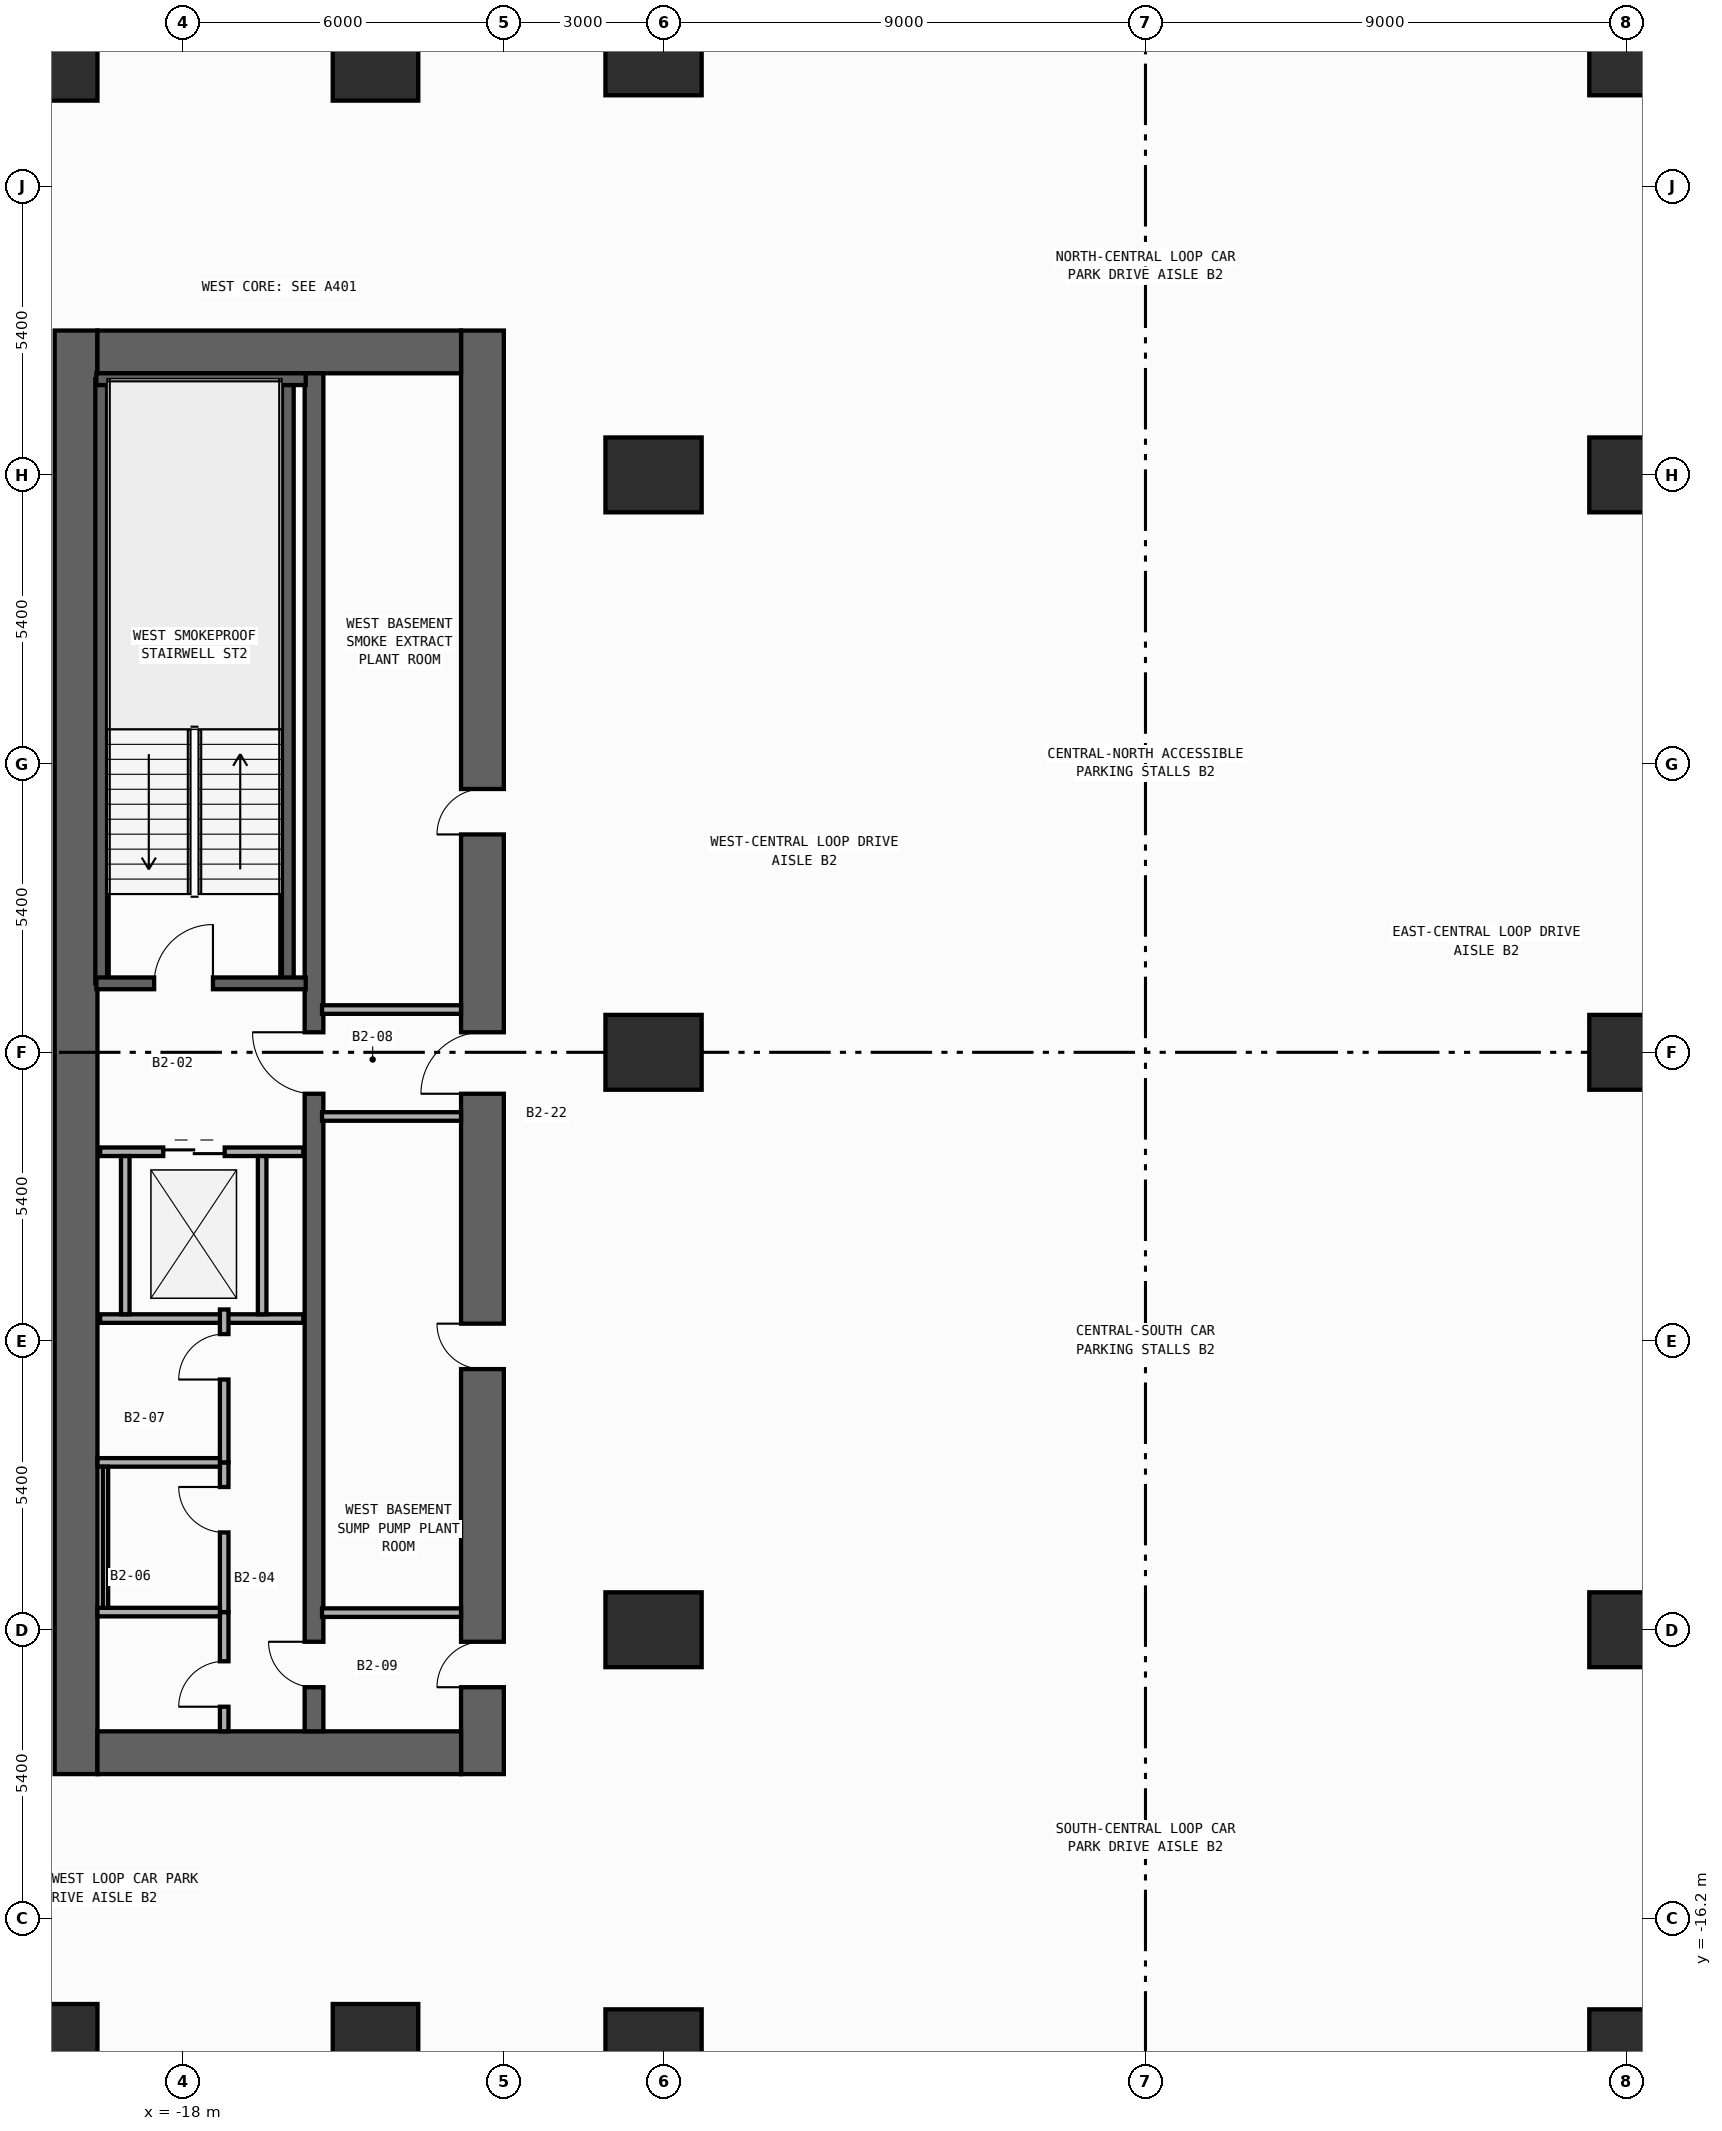
"""IFC4 building model, lengths in metres.
Left out: names, types, materials, properties, quantities, classifications, styles, units other than length and angle.
Written with IfcOpenShell. Run it as: python <this file> out.ifc"""

import sys

from ifc_helpers import new_model, si_unit, direction, frame, frame_2d, origin, origin_2d, place, context, subcontext, project, spatial, rectangle, extrude, element, fill, save


model = new_model("IFC4")
c1 = context("Model", 3, precision=1e-05, world=origin(), true_north=direction((0.0, 1.0)))
c2 = subcontext(c1, "Body", "Model", "MODEL_VIEW")
j1 = project(units=[si_unit("LENGTHUNIT", "METRE"), si_unit("PLANEANGLEUNIT", "RADIAN")], contexts=[c1])
p1 = place(None, origin())
s1 = spatial("IfcSite", under=j1, at=p1, CompositionType="ELEMENT")
p2 = place(p1, origin())
s2 = spatial("IfcBuilding", under=s1, at=p2, CompositionType="ELEMENT")
p3 = place(p2, frame((0.0, 0.0, -9.0)))
s3 = spatial("IfcBuildingStorey", under=s2, at=p3, CompositionType="ELEMENT", Elevation=-9.0)
p4 = place(p3, frame((-20.0, -13.5, 0.0), z_axis=(0.0, 0.0, 1.0), x_axis=(0.0, 1.0, 0.0)))
e1 = element("IfcWall", 1, at=p4, inside=s3, PredefinedType="SHEAR", context=c2, shape_type="SweptSolid", body=[
    extrude(rectangle(XDim=27.0, YDim=0.8, at=frame_2d((13.5, 0.0))), origin(), (0.0, 0.0, 1.0), 4.2),
])
p5 = place(p3, frame((-12.4, -13.5, 0.0), z_axis=(0.0, 0.0, 1.0), x_axis=(0.0, 1.0, 0.0)))
e2 = element("IfcWall", 2, at=p5, inside=s3, PredefinedType="SHEAR", context=c2, shape_type="SweptSolid", body=[
    extrude(rectangle(XDim=27.0, YDim=0.8, at=frame_2d((13.5, 0.0))), origin(), (0.0, 0.0, 1.0), 4.2),
])
p6 = place(p5, frame((17.575, 0.0, 0.0)))
e3 = element("IfcOpeningElement", 3, at=p6, cuts=e2, PredefinedType="OPENING", context=c2, shape_type="SweptSolid", body=[
    extrude(rectangle(XDim=0.85, YDim=2.1, at=frame_2d((0.425, 1.05))), frame((0.0, 0.41, 0.0), z_axis=(0.0, -1.0, 0.0), x_axis=(1.0, 0.0, 0.0)), (0.0, 0.0, 1.0), 0.82),
])
p7 = place(p5, frame((7.575, 0.0, 0.0)))
e4 = element("IfcOpeningElement", 4, at=p7, cuts=e2, PredefinedType="OPENING", context=c2, shape_type="SweptSolid", body=[
    extrude(rectangle(XDim=0.85, YDim=2.1, at=frame_2d((0.425, 1.05))), frame((0.0, 0.41, 0.0), z_axis=(0.0, -1.0, 0.0), x_axis=(1.0, 0.0, 0.0)), (0.0, 0.0, 1.0), 0.82),
])
p8 = place(p5, frame((12.725, 0.0, 0.0)))
e5 = element("IfcOpeningElement", 5, at=p8, cuts=e2, PredefinedType="OPENING", context=c2, shape_type="SweptSolid", body=[
    extrude(rectangle(XDim=1.15, YDim=2.2, at=frame_2d((0.575, 1.1))), frame((0.0, 0.41, 0.0), z_axis=(0.0, -1.0, 0.0), x_axis=(1.0, 0.0, 0.0)), (0.0, 0.0, 1.0), 0.82),
])
p9 = place(p5, frame((1.625, 0.0, 0.0)))
e6 = element("IfcOpeningElement", 6, at=p9, cuts=e2, PredefinedType="OPENING", context=c2, shape_type="SweptSolid", body=[
    extrude(rectangle(XDim=0.85, YDim=2.1, at=frame_2d((0.425, 1.05))), frame((0.0, 0.41, 0.0), z_axis=(0.0, -1.0, 0.0), x_axis=(1.0, 0.0, 0.0)), (0.0, 0.0, 1.0), 0.82),
])
for number, where, z_axis, x_axis in (
    (7, (-19.6, -13.1, 0.0), (0.0, 0.0, 1.0), (1.0, 0.0, 0.0)),
    (8, (-19.6, 13.1, 0.0), (0.0, 0.0, 1.0), (1.0, 0.0, 0.0)),
):
    element("IfcWall", number, at=place(p3, frame(where, z_axis=z_axis, x_axis=x_axis)), inside=s3, PredefinedType="SHEAR", context=c2, shape_type="SweptSolid", body=[
        extrude(rectangle(XDim=6.8, YDim=0.8, at=frame_2d((3.4, 0.0))), origin(), (0.0, 0.0, 1.0), 4.2),
    ])
p10 = place(p3, frame((-15.55, -12.7, 0.0), z_axis=(0.0, 0.0, 1.0), x_axis=(0.0, 1.0, 0.0)))
e9 = element("IfcWall", 9, at=p10, inside=s3, PredefinedType="SHEAR", context=c2, shape_type="SweptSolid", body=[
    extrude(rectangle(XDim=25.4, YDim=0.35, at=frame_2d((12.7, 0.0))), origin(), (0.0, 0.0, 1.0), 4.2),
])
p11 = place(p10, frame((11.925, 0.0, 0.0)))
e10 = element("IfcOpeningElement", 10, at=p11, cuts=e9, PredefinedType="OPENING", context=c2, shape_type="SweptSolid", body=[
    extrude(rectangle(XDim=1.15, YDim=2.2, at=frame_2d((0.575, 1.1))), frame((0.0, 0.185, 0.0), z_axis=(0.0, -1.0, 0.0), x_axis=(1.0, 0.0, 0.0)), (0.0, 0.0, 1.0), 0.37),
])
p12 = place(p10, frame((0.825, 0.0, 0.0)))
e11 = element("IfcOpeningElement", 11, at=p12, cuts=e9, PredefinedType="OPENING", context=c2, shape_type="SweptSolid", body=[
    extrude(rectangle(XDim=0.85, YDim=2.1, at=frame_2d((0.425, 1.05))), frame((0.0, 0.185, 0.0), z_axis=(0.0, -1.0, 0.0), x_axis=(1.0, 0.0, 0.0)), (0.0, 0.0, 1.0), 0.37),
])
for number, where, z_axis, x_axis in (
    (12, (-16.04, 1.29, 0.0), (0.0, 0.0, 1.0), (0.0, 1.0, 0.0)),
    (13, (-19.53, 1.29, 0.0), (0.0, 0.0, 1.0), (0.0, 1.0, 0.0)),
):
    element("IfcWall", number, at=place(p3, frame(where, z_axis=z_axis, x_axis=x_axis)), inside=s3, PredefinedType="SHEAR", context=c2, shape_type="SweptSolid", body=[
        extrude(rectangle(XDim=11.3, YDim=0.22, at=frame_2d((5.65, 0.0))), origin(), (0.0, 0.0, 1.0), 4.2),
    ])
p13 = place(p3, frame((-19.62, 12.59, 0.0), z_axis=(0.0, 0.0, 1.0), x_axis=(1.0, 0.0, 0.0)))
e14 = element("IfcWall", 14, at=p13, inside=s3, PredefinedType="SHEAR", context=c2, shape_type="SweptSolid", body=[
    extrude(rectangle(XDim=3.915, YDim=0.22, at=frame_2d((1.958, 0.0))), origin(), (0.0, 0.0, 1.0), 4.2),
])
p14 = place(p3, frame((-19.62, 1.29, 0.0), z_axis=(0.0, 0.0, 1.0), x_axis=(1.0, 0.0, 0.0)))
e15 = element("IfcWall", 15, at=p14, inside=s3, PredefinedType="SHEAR", context=c2, shape_type="SweptSolid", body=[
    extrude(rectangle(XDim=3.915, YDim=0.22, at=frame_2d((1.958, 0.0))), origin(), (0.0, 0.0, 1.0), 4.2),
])
p15 = place(p14, frame((1.08, 0.0, 0.0)))
e16 = element("IfcOpeningElement", 16, at=p15, cuts=e15, PredefinedType="OPENING", context=c2, shape_type="SweptSolid", body=[
    extrude(rectangle(XDim=1.1, YDim=2.2, at=frame_2d((0.55, 1.1))), frame((0.0, 0.12, 0.0), z_axis=(0.0, -1.0, 0.0), x_axis=(1.0, 0.0, 0.0)), (0.0, 0.0, 1.0), 0.24),
])
for number, where, z_axis, x_axis in (
    (17, (-9.2, -18.6, 0.0), (0.0, 0.0, 1.0), (1.0, 0.0, 0.0)),
    (18, (-9.2, -10.8, 0.0), (0.0, 0.0, 1.0), (1.0, 0.0, 0.0)),
    (19, (-9.2, 0.0, 0.0), (0.0, 0.0, 1.0), (1.0, 0.0, 0.0)),
    (20, (-9.2, 10.8, 0.0), (0.0, 0.0, 1.0), (1.0, 0.0, 0.0)),
    (21, (-9.2, 18.6, 0.0), (0.0, 0.0, 1.0), (1.0, 0.0, 0.0)),
    (22, (9.2, -18.6, 0.0), (0.0, 0.0, 1.0), (1.0, 0.0, 0.0)),
    (23, (9.2, -10.8, 0.0), (0.0, 0.0, 1.0), (1.0, 0.0, 0.0)),
    (24, (9.2, 0.0, 0.0), (0.0, 0.0, 1.0), (1.0, 0.0, 0.0)),
    (25, (9.2, 10.8, 0.0), (0.0, 0.0, 1.0), (1.0, 0.0, 0.0)),
    (26, (9.2, 18.6, 0.0), (0.0, 0.0, 1.0), (1.0, 0.0, 0.0)),
):
    element("IfcColumn", number, at=place(p3, frame(where, z_axis=z_axis, x_axis=x_axis)), inside=s3, PredefinedType="COLUMN", context=c2, shape_type="SweptSolid", body=[
        extrude(rectangle(XDim=1.8, YDim=1.4, at=origin_2d()), origin(), (0.0, 0.0, 1.0), 4.5),
    ])
for number, where, z_axis, x_axis in (
    (27, (-20.4, -18.6, 0.0), (0.0, 0.0, 1.0), (1.0, 0.0, 0.0)),
    (28, (-20.4, 18.6, 0.0), (0.0, 0.0, 1.0), (1.0, 0.0, 0.0)),
    (29, (-14.4, -18.6, 0.0), (0.0, 0.0, 1.0), (1.0, 0.0, 0.0)),
    (30, (-14.4, 18.6, 0.0), (0.0, 0.0, 1.0), (1.0, 0.0, 0.0)),
):
    element("IfcColumn", number, at=place(p3, frame(where, z_axis=z_axis, x_axis=x_axis)), inside=s3, PredefinedType="COLUMN", context=c2, shape_type="SweptSolid", body=[
        extrude(rectangle(XDim=1.6, YDim=1.6, at=origin_2d()), origin(), (0.0, 0.0, 1.0), 4.5),
    ])
p16 = place(p3, frame((-19.55, -1.86, 0.0), z_axis=(0.0, 0.0, 1.0), x_axis=(1.0, 0.0, 0.0)))
e31 = element("IfcWall", 31, at=p16, inside=s3, PredefinedType="STANDARD", context=c2, shape_type="SweptSolid", body=[
    extrude(rectangle(XDim=3.8, YDim=0.16, at=frame_2d((1.9, 0.0))), origin(), (0.0, 0.0, 1.0), 4.2),
])
p17 = place(p16, frame((1.18, 0.0, 0.0)))
e32 = element("IfcOpeningElement", 32, at=p17, cuts=e31, PredefinedType="OPENING", context=c2, shape_type="SweptSolid", body=[
    extrude(rectangle(XDim=1.15, YDim=2.2, at=frame_2d((0.575, 1.1))), frame((0.0, 0.09, 0.0), z_axis=(0.0, -1.0, 0.0), x_axis=(1.0, 0.0, 0.0)), (0.0, 0.0, 1.0), 0.18),
])
p18 = place(p3, frame((-19.55, -4.98, 0.0), z_axis=(0.0, 0.0, 1.0), x_axis=(1.0, 0.0, 0.0)))
e33 = element("IfcWall", 33, at=p18, inside=s3, PredefinedType="STANDARD", context=c2, shape_type="SweptSolid", body=[
    extrude(rectangle(XDim=3.8, YDim=0.16, at=frame_2d((1.9, 0.0))), origin(), (0.0, 0.0, 1.0), 4.2),
])
for number, where, z_axis, x_axis in (
    (34, (-19.08, -4.9, 0.0), (0.0, 0.0, 1.0), (0.0, 1.0, 0.0)),
    (35, (-16.52, -4.9, 0.0), (0.0, 0.0, 1.0), (0.0, 1.0, 0.0)),
):
    element("IfcWall", number, at=place(p3, frame(where, z_axis=z_axis, x_axis=x_axis)), inside=s3, PredefinedType="STANDARD", context=c2, shape_type="SweptSolid", body=[
        extrude(rectangle(XDim=2.96, YDim=0.16, at=frame_2d((1.48, 0.0))), origin(), (0.0, 0.0, 1.0), 4.2),
    ])
for number, where, z_axis, x_axis in (
    (36, (-15.4, 0.8, 0.0), (0.0, 0.0, 1.0), (1.0, 0.0, 0.0)),
    (37, (-15.4, -1.2, 0.0), (0.0, 0.0, 1.0), (1.0, 0.0, 0.0)),
    (38, (-15.4, -10.48, 0.0), (0.0, 0.0, 1.0), (1.0, 0.0, 0.0)),
):
    element("IfcWall", number, at=place(p3, frame(where, z_axis=z_axis, x_axis=x_axis)), inside=s3, PredefinedType="STANDARD", context=c2, shape_type="SweptSolid", body=[
        extrude(rectangle(XDim=2.6, YDim=0.16, at=frame_2d((1.3, 0.0))), origin(), (0.0, 0.0, 1.0), 4.2),
    ])
p19 = place(p3, frame((-17.23, -12.7, 0.0), z_axis=(0.0, 0.0, 1.0), x_axis=(0.0, 1.0, 0.0)))
e39 = element("IfcWall", 39, at=p19, inside=s3, PredefinedType="PARTITIONING", context=c2, shape_type="SweptSolid", body=[
    extrude(rectangle(XDim=2.23, YDim=0.16, at=frame_2d((1.115, 0.0))), origin(), (0.0, 0.0, 1.0), 4.2),
])
p20 = place(p19, frame((0.46, 0.0, 0.0)))
e40 = element("IfcOpeningElement", 40, at=p20, cuts=e39, PredefinedType="OPENING", context=c2, shape_type="SweptSolid", body=[
    extrude(rectangle(XDim=0.85, YDim=2.1, at=frame_2d((0.425, 1.05))), frame((0.0, 0.09, 0.0), z_axis=(0.0, -1.0, 0.0), x_axis=(1.0, 0.0, 0.0)), (0.0, 0.0, 1.0), 0.18),
])
p21 = place(p3, frame((-17.23, -10.47, 0.0), z_axis=(0.0, 0.0, 1.0), x_axis=(0.0, 1.0, 0.0)))
e41 = element("IfcWall", 41, at=p21, inside=s3, PredefinedType="PARTITIONING", context=c2, shape_type="SweptSolid", body=[
    extrude(rectangle(XDim=2.8, YDim=0.16, at=frame_2d((1.4, 0.0))), origin(), (0.0, 0.0, 1.0), 4.2),
])
p22 = place(p21, frame((1.49, 0.0, 0.0)))
e42 = element("IfcOpeningElement", 42, at=p22, cuts=e41, PredefinedType="OPENING", context=c2, shape_type="SweptSolid", body=[
    extrude(rectangle(XDim=0.85, YDim=2.1, at=frame_2d((0.425, 1.05))), frame((0.0, 0.09, 0.0), z_axis=(0.0, -1.0, 0.0), x_axis=(1.0, 0.0, 0.0)), (0.0, 0.0, 1.0), 0.18),
])
p23 = place(p3, frame((-17.23, -7.67, 0.0), z_axis=(0.0, 0.0, 1.0), x_axis=(0.0, 1.0, 0.0)))
e43 = element("IfcWall", 43, at=p23, inside=s3, PredefinedType="PARTITIONING", context=c2, shape_type="SweptSolid", body=[
    extrude(rectangle(XDim=2.86, YDim=0.16, at=frame_2d((1.43, 0.0))), origin(), (0.0, 0.0, 1.0), 4.2),
])
p24 = place(p23, frame((1.55, 0.0, 0.0)))
e44 = element("IfcOpeningElement", 44, at=p24, cuts=e43, PredefinedType="OPENING", context=c2, shape_type="SweptSolid", body=[
    extrude(rectangle(XDim=0.85, YDim=2.1, at=frame_2d((0.425, 1.05))), frame((0.0, 0.09, 0.0), z_axis=(0.0, -1.0, 0.0), x_axis=(1.0, 0.0, 0.0)), (0.0, 0.0, 1.0), 0.18),
])
for number, where, z_axis, x_axis in (
    (45, (-19.6, -10.47, 0.0), (0.0, 0.0, 1.0), (1.0, 0.0, 0.0)),
    (46, (-19.6, -7.67, 0.0), (0.0, 0.0, 1.0), (1.0, 0.0, 0.0)),
):
    element("IfcWall", number, at=place(p3, frame(where, z_axis=z_axis, x_axis=x_axis)), inside=s3, PredefinedType="PARTITIONING", context=c2, shape_type="SweptSolid", body=[
        extrude(rectangle(XDim=2.29, YDim=0.16, at=frame_2d((1.145, 0.0))), origin(), (0.0, 0.0, 1.0), 4.2),
    ])
p25 = place(p3, frame((-19.45, -10.39, 0.0), z_axis=(0.0, 0.0, 1.0), x_axis=(0.0, 1.0, 0.0)))
e47 = element("IfcWall", 47, at=p25, inside=s3, PredefinedType="PARTITIONING", context=c2, shape_type="SweptSolid", body=[
    extrude(rectangle(XDim=2.64, YDim=0.1, at=frame_2d((1.32, 0.0))), origin(), (0.0, 0.0, 1.0), 4.2),
])
p26 = place(p15, origin())
e48 = element("IfcDoor", 48, at=p26, inside=s3, OperationType="SINGLE_SWING_RIGHT", PredefinedType="DOOR", context=c2, shape_type="SweptSolid", body=[
    extrude(rectangle(XDim=1.1, YDim=2.2, at=frame_2d((0.55, 1.1))), frame((0.0, 0.025, 0.0), z_axis=(0.0, -1.0, 0.0), x_axis=(1.0, 0.0, 0.0)), (0.0, 0.0, 1.0), 0.05),
])
fill(e16, e48)
p27 = place(p6, origin())
e49 = element("IfcDoor", 49, at=p27, inside=s3, OperationType="SINGLE_SWING_LEFT", PredefinedType="DOOR", context=c2, shape_type="SweptSolid", body=[
    extrude(rectangle(XDim=0.85, YDim=2.1, at=frame_2d((0.425, 1.05))), frame((0.0, 0.025, 0.0), z_axis=(0.0, -1.0, 0.0), x_axis=(1.0, 0.0, 0.0)), (0.0, 0.0, 1.0), 0.05),
])
fill(e3, e49)
p28 = place(p7, origin())
e50 = element("IfcDoor", 50, at=p28, inside=s3, OperationType="SINGLE_SWING_RIGHT", PredefinedType="DOOR", context=c2, shape_type="SweptSolid", body=[
    extrude(rectangle(XDim=0.85, YDim=2.1, at=frame_2d((0.425, 1.05))), frame((0.0, 0.025, 0.0), z_axis=(0.0, -1.0, 0.0), x_axis=(1.0, 0.0, 0.0)), (0.0, 0.0, 1.0), 0.05),
])
fill(e4, e50)
p29 = place(p8, origin())
e51 = element("IfcDoor", 51, at=p29, inside=s3, OperationType="SINGLE_SWING_LEFT", PredefinedType="DOOR", context=c2, shape_type="SweptSolid", body=[
    extrude(rectangle(XDim=1.15, YDim=2.2, at=frame_2d((0.575, 1.1))), frame((0.0, 0.025, 0.0), z_axis=(0.0, -1.0, 0.0), x_axis=(1.0, 0.0, 0.0)), (0.0, 0.0, 1.0), 0.05),
])
fill(e5, e51)
p30 = place(p11, origin())
e52 = element("IfcDoor", 52, at=p30, inside=s3, OperationType="SINGLE_SWING_RIGHT", PredefinedType="DOOR", context=c2, shape_type="SweptSolid", body=[
    extrude(rectangle(XDim=1.15, YDim=2.2, at=frame_2d((0.575, 1.1))), frame((0.0, 0.025, 0.0), z_axis=(0.0, -1.0, 0.0), x_axis=(1.0, 0.0, 0.0)), (0.0, 0.0, 1.0), 0.05),
])
fill(e10, e52)
p31 = place(p9, origin())
e53 = element("IfcDoor", 53, at=p31, inside=s3, OperationType="SINGLE_SWING_LEFT", PredefinedType="DOOR", context=c2, shape_type="SweptSolid", body=[
    extrude(rectangle(XDim=0.85, YDim=2.1, at=frame_2d((0.425, 1.05))), frame((0.0, 0.025, 0.0), z_axis=(0.0, -1.0, 0.0), x_axis=(1.0, 0.0, 0.0)), (0.0, 0.0, 1.0), 0.05),
])
fill(e6, e53)
p32 = place(p12, origin())
e54 = element("IfcDoor", 54, at=p32, inside=s3, OperationType="SINGLE_SWING_RIGHT", PredefinedType="DOOR", context=c2, shape_type="SweptSolid", body=[
    extrude(rectangle(XDim=0.85, YDim=2.1, at=frame_2d((0.425, 1.05))), frame((0.0, 0.025, 0.0), z_axis=(0.0, -1.0, 0.0), x_axis=(1.0, 0.0, 0.0)), (0.0, 0.0, 1.0), 0.05),
])
fill(e11, e54)
p33 = place(p17, origin())
e55 = element("IfcDoor", 55, at=p33, inside=s3, OperationType="DOUBLE_DOOR_SLIDING", PredefinedType="DOOR", context=c2, shape_type="SweptSolid", body=[
    extrude(rectangle(XDim=1.15, YDim=2.2, at=frame_2d((0.575, 1.1))), frame((0.0, 0.025, 0.0), z_axis=(0.0, -1.0, 0.0), x_axis=(1.0, 0.0, 0.0)), (0.0, 0.0, 1.0), 0.05),
])
fill(e32, e55)
p34 = place(p20, origin())
e56 = element("IfcDoor", 56, at=p34, inside=s3, OperationType="SINGLE_SWING_LEFT", PredefinedType="DOOR", context=c2, shape_type="SweptSolid", body=[
    extrude(rectangle(XDim=0.85, YDim=2.1, at=frame_2d((0.425, 1.05))), frame((0.0, 0.025, 0.0), z_axis=(0.0, -1.0, 0.0), x_axis=(1.0, 0.0, 0.0)), (0.0, 0.0, 1.0), 0.05),
])
fill(e40, e56)
p35 = place(p22, origin())
e57 = element("IfcDoor", 57, at=p35, inside=s3, OperationType="SINGLE_SWING_RIGHT", PredefinedType="DOOR", context=c2, shape_type="SweptSolid", body=[
    extrude(rectangle(XDim=0.85, YDim=2.1, at=frame_2d((0.425, 1.05))), frame((0.0, 0.025, 0.0), z_axis=(0.0, -1.0, 0.0), x_axis=(1.0, 0.0, 0.0)), (0.0, 0.0, 1.0), 0.05),
])
fill(e42, e57)
p36 = place(p24, origin())
e58 = element("IfcDoor", 58, at=p36, inside=s3, OperationType="SINGLE_SWING_LEFT", PredefinedType="DOOR", context=c2, shape_type="SweptSolid", body=[
    extrude(rectangle(XDim=0.85, YDim=2.1, at=frame_2d((0.425, 1.05))), frame((0.0, 0.025, 0.0), z_axis=(0.0, -1.0, 0.0), x_axis=(1.0, 0.0, 0.0)), (0.0, 0.0, 1.0), 0.05),
])
fill(e44, e58)
save(model, sys.argv[1])
